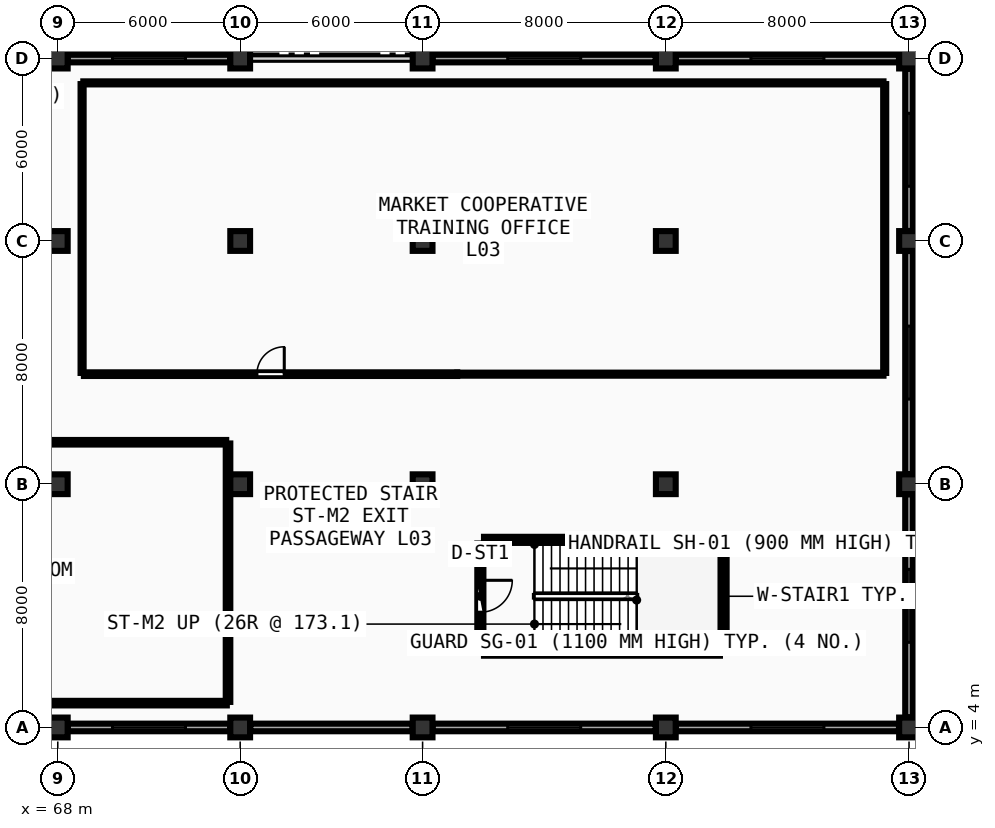
"""IFC4 building model, lengths in metres.
Left out: names, types, materials, properties, quantities, classifications, styles, units other than length and angle.
Written with IfcOpenShell. Run it as: python <this file> out.ifc"""

import sys

from ifc_helpers import new_model, si_unit, direction, frame, frame_2d, origin, origin_2d, place, context, subcontext, project, spatial, rectangle, extrude, element, fill, save


model = new_model("IFC4")
c1 = context("Model", 3, precision=1e-05, world=origin(), true_north=direction((0.0, 1.0)))
c2 = subcontext(c1, "Body", "Model", "MODEL_VIEW")
j1 = project(units=[si_unit("LENGTHUNIT", "METRE"), si_unit("PLANEANGLEUNIT", "RADIAN")], contexts=[c1])
p1 = place(None, origin())
s1 = spatial("IfcSite", under=j1, at=p1, CompositionType="ELEMENT")
p2 = place(p1, origin())
s2 = spatial("IfcBuilding", under=s1, at=p2, CompositionType="ELEMENT")
p3 = place(p2, frame((0.0, 0.0, 13.5)))
s3 = spatial("IfcBuildingStorey", under=s2, at=p3, CompositionType="ELEMENT", Elevation=13.5)
for number, where, z_axis, x_axis in (
    (1, (68.0, 4.0, 0.0), (0.0, 0.0, 1.0), (1.0, 0.0, 0.0)),
    (2, (68.0, 12.0, 0.0), (0.0, 0.0, 1.0), (1.0, 0.0, 0.0)),
    (3, (68.0, 20.0, 0.0), (0.0, 0.0, 1.0), (1.0, 0.0, 0.0)),
    (4, (68.0, 26.0, 0.0), (0.0, 0.0, 1.0), (1.0, 0.0, 0.0)),
    (5, (74.0, 4.0, 0.0), (0.0, 0.0, 1.0), (1.0, 0.0, 0.0)),
    (6, (74.0, 12.0, 0.0), (0.0, 0.0, 1.0), (1.0, 0.0, 0.0)),
    (7, (74.0, 20.0, 0.0), (0.0, 0.0, 1.0), (1.0, 0.0, 0.0)),
    (8, (74.0, 26.0, 0.0), (0.0, 0.0, 1.0), (1.0, 0.0, 0.0)),
    (9, (80.0, 4.0, 0.0), (0.0, 0.0, 1.0), (1.0, 0.0, 0.0)),
    (10, (80.0, 12.0, 0.0), (0.0, 0.0, 1.0), (1.0, 0.0, 0.0)),
    (11, (80.0, 20.0, 0.0), (0.0, 0.0, 1.0), (1.0, 0.0, 0.0)),
    (12, (80.0, 26.0, 0.0), (0.0, 0.0, 1.0), (1.0, 0.0, 0.0)),
    (13, (88.0, 4.0, 0.0), (0.0, 0.0, 1.0), (1.0, 0.0, 0.0)),
    (14, (88.0, 12.0, 0.0), (0.0, 0.0, 1.0), (1.0, 0.0, 0.0)),
    (15, (88.0, 20.0, 0.0), (0.0, 0.0, 1.0), (1.0, 0.0, 0.0)),
    (16, (88.0, 26.0, 0.0), (0.0, 0.0, 1.0), (1.0, 0.0, 0.0)),
    (17, (96.0, 4.0, 0.0), (0.0, 0.0, 1.0), (1.0, 0.0, 0.0)),
    (18, (96.0, 12.0, 0.0), (0.0, 0.0, 1.0), (1.0, 0.0, 0.0)),
    (19, (96.0, 20.0, 0.0), (0.0, 0.0, 1.0), (1.0, 0.0, 0.0)),
    (20, (96.0, 26.0, 0.0), (0.0, 0.0, 1.0), (1.0, 0.0, 0.0)),
):
    element("IfcColumn", number, at=place(p3, frame(where, z_axis=z_axis, x_axis=x_axis)), inside=s3, PredefinedType="COLUMN", context=c2, shape_type="SweptSolid", body=[
        extrude(rectangle(XDim=0.65, YDim=0.65, at=origin_2d()), origin(), (0.0, 0.0, 1.0), 4.5),
    ])
p4 = place(p3, frame((68.33, 4.0, 0.0), z_axis=(0.0, 0.0, 1.0), x_axis=(1.0, 0.0, 0.0)))
e21 = element("IfcWall", 21, at=p4, inside=s3, PredefinedType="SOLIDWALL", context=c2, shape_type="SweptSolid", body=[
    extrude(rectangle(XDim=5.34, YDim=0.25, at=frame_2d((2.67, 0.0))), origin(), (0.0, 0.0, 1.0), 3.42),
])
p5 = place(p4, frame((1.47, 0.0, 0.95)))
e22 = element("IfcOpeningElement", 22, at=p5, cuts=e21, PredefinedType="OPENING", context=c2, shape_type="SweptSolid", body=[
    extrude(rectangle(XDim=2.4, YDim=1.65, at=frame_2d((1.2, 0.825))), frame((0.0, 0.135, 0.0), z_axis=(0.0, -1.0, 0.0), x_axis=(1.0, 0.0, 0.0)), (0.0, 0.0, 1.0), 0.27),
])
p6 = place(p3, frame((74.33, 4.0, 0.0), z_axis=(0.0, 0.0, 1.0), x_axis=(1.0, 0.0, 0.0)))
e23 = element("IfcWall", 23, at=p6, inside=s3, PredefinedType="SOLIDWALL", context=c2, shape_type="SweptSolid", body=[
    extrude(rectangle(XDim=5.34, YDim=0.25, at=frame_2d((2.67, 0.0))), origin(), (0.0, 0.0, 1.0), 3.42),
])
p7 = place(p3, frame((80.33, 4.0, 0.0), z_axis=(0.0, 0.0, 1.0), x_axis=(1.0, 0.0, 0.0)))
e24 = element("IfcWall", 24, at=p7, inside=s3, PredefinedType="SOLIDWALL", context=c2, shape_type="SweptSolid", body=[
    extrude(rectangle(XDim=7.34, YDim=0.25, at=frame_2d((3.67, 0.0))), origin(), (0.0, 0.0, 1.0), 3.42),
])
p8 = place(p7, frame((2.47, 0.0, 0.95)))
e25 = element("IfcOpeningElement", 25, at=p8, cuts=e24, PredefinedType="OPENING", context=c2, shape_type="SweptSolid", body=[
    extrude(rectangle(XDim=2.4, YDim=1.65, at=frame_2d((1.2, 0.825))), frame((0.0, 0.135, 0.0), z_axis=(0.0, -1.0, 0.0), x_axis=(1.0, 0.0, 0.0)), (0.0, 0.0, 1.0), 0.27),
])
p9 = place(p3, frame((88.33, 4.0, 0.0), z_axis=(0.0, 0.0, 1.0), x_axis=(1.0, 0.0, 0.0)))
e26 = element("IfcWall", 26, at=p9, inside=s3, PredefinedType="SOLIDWALL", context=c2, shape_type="SweptSolid", body=[
    extrude(rectangle(XDim=7.34, YDim=0.25, at=frame_2d((3.67, 0.0))), origin(), (0.0, 0.0, 1.0), 3.42),
])
p10 = place(p9, frame((2.47, 0.0, 0.95)))
e27 = element("IfcOpeningElement", 27, at=p10, cuts=e26, PredefinedType="OPENING", context=c2, shape_type="SweptSolid", body=[
    extrude(rectangle(XDim=2.4, YDim=1.65, at=frame_2d((1.2, 0.825))), frame((0.0, 0.135, 0.0), z_axis=(0.0, -1.0, 0.0), x_axis=(1.0, 0.0, 0.0)), (0.0, 0.0, 1.0), 0.27),
])
p11 = place(p3, frame((96.0, 4.33, 0.0), z_axis=(0.0, 0.0, 1.0), x_axis=(0.0, 1.0, 0.0)))
e28 = element("IfcWall", 28, at=p11, inside=s3, PredefinedType="SOLIDWALL", context=c2, shape_type="SweptSolid", body=[
    extrude(rectangle(XDim=7.34, YDim=0.25, at=frame_2d((3.67, 0.0))), origin(), (0.0, 0.0, 1.0), 3.42),
])
p12 = place(p11, frame((2.47, 0.0, 0.95)))
e29 = element("IfcOpeningElement", 29, at=p12, cuts=e28, PredefinedType="OPENING", context=c2, shape_type="SweptSolid", body=[
    extrude(rectangle(XDim=2.4, YDim=1.65, at=frame_2d((1.2, 0.825))), frame((0.0, 0.135, 0.0), z_axis=(0.0, -1.0, 0.0), x_axis=(1.0, 0.0, 0.0)), (0.0, 0.0, 1.0), 0.27),
])
p13 = place(p3, frame((96.0, 12.33, 0.0), z_axis=(0.0, 0.0, 1.0), x_axis=(0.0, 1.0, 0.0)))
e30 = element("IfcWall", 30, at=p13, inside=s3, PredefinedType="SOLIDWALL", context=c2, shape_type="SweptSolid", body=[
    extrude(rectangle(XDim=7.34, YDim=0.25, at=frame_2d((3.67, 0.0))), origin(), (0.0, 0.0, 1.0), 3.42),
])
p14 = place(p13, frame((2.47, 0.0, 0.95)))
e31 = element("IfcOpeningElement", 31, at=p14, cuts=e30, PredefinedType="OPENING", context=c2, shape_type="SweptSolid", body=[
    extrude(rectangle(XDim=2.4, YDim=1.65, at=frame_2d((1.2, 0.825))), frame((0.0, 0.135, 0.0), z_axis=(0.0, -1.0, 0.0), x_axis=(1.0, 0.0, 0.0)), (0.0, 0.0, 1.0), 0.27),
])
p15 = place(p3, frame((96.0, 20.33, 0.0), z_axis=(0.0, 0.0, 1.0), x_axis=(0.0, 1.0, 0.0)))
e32 = element("IfcWall", 32, at=p15, inside=s3, PredefinedType="SOLIDWALL", context=c2, shape_type="SweptSolid", body=[
    extrude(rectangle(XDim=5.34, YDim=0.25, at=frame_2d((2.67, 0.0))), origin(), (0.0, 0.0, 1.0), 3.42),
])
p16 = place(p15, frame((1.47, 0.0, 0.95)))
e33 = element("IfcOpeningElement", 33, at=p16, cuts=e32, PredefinedType="OPENING", context=c2, shape_type="SweptSolid", body=[
    extrude(rectangle(XDim=2.4, YDim=1.65, at=frame_2d((1.2, 0.825))), frame((0.0, 0.135, 0.0), z_axis=(0.0, -1.0, 0.0), x_axis=(1.0, 0.0, 0.0)), (0.0, 0.0, 1.0), 0.27),
])
p17 = place(p3, frame((95.67, 26.0, 0.0), z_axis=(0.0, 0.0, 1.0), x_axis=(-1.0, 0.0, 0.0)))
e34 = element("IfcWall", 34, at=p17, inside=s3, PredefinedType="SOLIDWALL", context=c2, shape_type="SweptSolid", body=[
    extrude(rectangle(XDim=7.34, YDim=0.25, at=frame_2d((3.67, 0.0))), origin(), (0.0, 0.0, 1.0), 3.42),
])
p18 = place(p17, frame((2.47, 0.0, 0.95)))
e35 = element("IfcOpeningElement", 35, at=p18, cuts=e34, PredefinedType="OPENING", context=c2, shape_type="SweptSolid", body=[
    extrude(rectangle(XDim=2.4, YDim=1.65, at=frame_2d((1.2, 0.825))), frame((0.0, 0.135, 0.0), z_axis=(0.0, -1.0, 0.0), x_axis=(1.0, 0.0, 0.0)), (0.0, 0.0, 1.0), 0.27),
])
p19 = place(p3, frame((87.67, 26.0, 0.0), z_axis=(0.0, 0.0, 1.0), x_axis=(-1.0, 0.0, 0.0)))
e36 = element("IfcWall", 36, at=p19, inside=s3, PredefinedType="SOLIDWALL", context=c2, shape_type="SweptSolid", body=[
    extrude(rectangle(XDim=7.34, YDim=0.25, at=frame_2d((3.67, 0.0))), origin(), (0.0, 0.0, 1.0), 3.42),
])
p20 = place(p19, frame((2.47, 0.0, 0.95)))
e37 = element("IfcOpeningElement", 37, at=p20, cuts=e36, PredefinedType="OPENING", context=c2, shape_type="SweptSolid", body=[
    extrude(rectangle(XDim=2.4, YDim=1.65, at=frame_2d((1.2, 0.825))), frame((0.0, 0.135, 0.0), z_axis=(0.0, -1.0, 0.0), x_axis=(1.0, 0.0, 0.0)), (0.0, 0.0, 1.0), 0.27),
])
p21 = place(p3, frame((73.67, 26.0, 0.0), z_axis=(0.0, 0.0, 1.0), x_axis=(-1.0, 0.0, 0.0)))
e38 = element("IfcWall", 38, at=p21, inside=s3, PredefinedType="SOLIDWALL", context=c2, shape_type="SweptSolid", body=[
    extrude(rectangle(XDim=5.34, YDim=0.25, at=frame_2d((2.67, 0.0))), origin(), (0.0, 0.0, 1.0), 3.42),
])
p22 = place(p21, frame((1.47, 0.0, 0.95)))
e39 = element("IfcOpeningElement", 39, at=p22, cuts=e38, PredefinedType="OPENING", context=c2, shape_type="SweptSolid", body=[
    extrude(rectangle(XDim=2.4, YDim=1.65, at=frame_2d((1.2, 0.825))), frame((0.0, 0.135, 0.0), z_axis=(0.0, -1.0, 0.0), x_axis=(1.0, 0.0, 0.0)), (0.0, 0.0, 1.0), 0.27),
])
p23 = place(p3, frame((82.02, 6.46, 0.0), z_axis=(0.0, 0.0, 1.0), x_axis=(1.0, 0.0, 0.0)))
e40 = element("IfcWall", 40, at=p23, inside=s3, PredefinedType="SHEAR", context=c2, shape_type="SweptSolid", body=[
    extrude(rectangle(XDim=7.76, YDim=0.2, at=frame_2d((3.88, 0.0))), origin(), (0.0, 0.0, 1.0), 4.24),
])
p24 = place(p3, frame((89.9, 6.58, 0.0), z_axis=(0.0, 0.0, 1.0), x_axis=(0.0, 1.0, 0.0)))
e41 = element("IfcWall", 41, at=p24, inside=s3, PredefinedType="SHEAR", context=c2, shape_type="SweptSolid", body=[
    extrude(rectangle(XDim=3.47, YDim=0.2, at=frame_2d((1.735, 0.0))), origin(), (0.0, 0.0, 1.0), 4.24),
])
p25 = place(p3, frame((89.78, 10.17, 0.0), z_axis=(0.0, 0.0, 1.0), x_axis=(-1.0, 0.0, 0.0)))
e42 = element("IfcWall", 42, at=p25, inside=s3, PredefinedType="SHEAR", context=c2, shape_type="SweptSolid", body=[
    extrude(rectangle(XDim=7.76, YDim=0.2, at=frame_2d((3.88, 0.0))), origin(), (0.0, 0.0, 1.0), 4.24),
])
p26 = place(p3, frame((81.9, 10.05, 0.0), z_axis=(0.0, 0.0, 1.0), x_axis=(0.0, -1.0, 0.0)))
e43 = element("IfcWall", 43, at=p26, inside=s3, PredefinedType="SHEAR", context=c2, shape_type="SweptSolid", body=[
    extrude(rectangle(XDim=3.47, YDim=0.2, at=frame_2d((1.735, 0.0))), origin(), (0.0, 0.0, 1.0), 4.24),
])
p27 = place(p26, frame((1.21, 0.0, 0.0)))
e44 = element("IfcOpeningElement", 44, at=p27, cuts=e43, PredefinedType="OPENING", context=c2, shape_type="SweptSolid", body=[
    extrude(rectangle(XDim=1.05, YDim=2.1, at=frame_2d((0.525, 1.05))), frame((0.0, 0.11, 0.0), z_axis=(0.0, -1.0, 0.0), x_axis=(1.0, 0.0, 0.0)), (0.0, 0.0, 1.0), 0.22),
])
p28 = place(p3, frame((68.86, 15.62, 0.0), z_axis=(0.0, 0.0, 1.0), x_axis=(1.0, 0.0, 0.0)))
e45 = element("IfcWall", 45, at=p28, inside=s3, PredefinedType="PARTITIONING", context=c2, shape_type="SweptSolid", body=[
    extrude(rectangle(XDim=12.28, YDim=0.12, at=frame_2d((6.14, 0.0))), origin(), (0.0, 0.0, 1.0), 3.425),
])
p29 = place(p28, frame((5.69, 0.0, 0.0)))
e46 = element("IfcOpeningElement", 46, at=p29, cuts=e45, PredefinedType="OPENING", context=c2, shape_type="SweptSolid", body=[
    extrude(rectangle(XDim=0.9, YDim=2.08, at=frame_2d((0.45, 1.04))), frame((0.0, 0.07, 0.0), z_axis=(0.0, -1.0, 0.0), x_axis=(1.0, 0.0, 0.0)), (0.0, 0.0, 1.0), 0.14),
])
p30 = place(p3, frame((36.86, 13.38, 0.0), z_axis=(0.0, 0.0, 1.0), x_axis=(1.0, 0.0, 0.0)))
e47 = element("IfcWall", 47, at=p30, inside=s3, PredefinedType="PARTITIONING", context=c2, shape_type="SweptSolid", body=[
    extrude(rectangle(XDim=36.68, YDim=0.15, at=frame_2d((18.34, 0.0))), origin(), (0.0, 0.0, 1.0), 3.425),
])
p31 = place(p30, frame((17.8, 0.0, 0.0)))
e48 = element("IfcOpeningElement", 48, at=p31, cuts=e47, PredefinedType="OPENING", context=c2, shape_type="SweptSolid", body=[
    extrude(rectangle(XDim=1.08, YDim=2.1, at=frame_2d((0.54, 1.05))), frame((0.0, 0.085, 0.0), z_axis=(0.0, -1.0, 0.0), x_axis=(1.0, 0.0, 0.0)), (0.0, 0.0, 1.0), 0.17),
])
p32 = place(p3, frame((81.14, 15.62, 0.0), z_axis=(0.0, 0.0, 1.0), x_axis=(1.0, 0.0, 0.0)))
e49 = element("IfcWall", 49, at=p32, inside=s3, PredefinedType="PARTITIONING", context=c2, shape_type="SweptSolid", body=[
    extrude(rectangle(XDim=14.02, YDim=0.1, at=frame_2d((7.01, 0.0))), origin(), (0.0, 0.0, 1.0), 3.425),
])
p33 = place(p3, frame((95.2, 15.66, 0.0), z_axis=(0.0, 0.0, 1.0), x_axis=(0.0, 1.0, 0.0)))
e50 = element("IfcWall", 50, at=p33, inside=s3, PredefinedType="PARTITIONING", context=c2, shape_type="SweptSolid", body=[
    extrude(rectangle(XDim=9.5, YDim=0.1, at=frame_2d((4.75, 0.0))), origin(), (0.0, 0.0, 1.0), 3.425),
])
p34 = place(p3, frame((95.16, 25.2, 0.0), z_axis=(0.0, 0.0, 1.0), x_axis=(-1.0, 0.0, 0.0)))
e51 = element("IfcWall", 51, at=p34, inside=s3, PredefinedType="PARTITIONING", context=c2, shape_type="SweptSolid", body=[
    extrude(rectangle(XDim=26.32, YDim=0.1, at=frame_2d((13.16, 0.0))), origin(), (0.0, 0.0, 1.0), 3.425),
])
p35 = place(p3, frame((68.8, 25.16, 0.0), z_axis=(0.0, 0.0, 1.0), x_axis=(0.0, -1.0, 0.0)))
e52 = element("IfcWall", 52, at=p35, inside=s3, PredefinedType="PARTITIONING", context=c2, shape_type="SweptSolid", body=[
    extrude(rectangle(XDim=9.5, YDim=0.1, at=frame_2d((4.75, 0.0))), origin(), (0.0, 0.0, 1.0), 3.425),
])
p36 = place(p3, frame((36.84, 4.8, 0.0), z_axis=(0.0, 0.0, 1.0), x_axis=(1.0, 0.0, 0.0)))
e53 = element("IfcWall", 53, at=p36, inside=s3, PredefinedType="PARTITIONING", context=c2, shape_type="SweptSolid", body=[
    extrude(rectangle(XDim=36.72, YDim=0.15, at=frame_2d((18.36, 0.0))), origin(), (0.0, 0.0, 1.0), 3.425),
])
p37 = place(p3, frame((73.6, 4.84, 0.0), z_axis=(0.0, 0.0, 1.0), x_axis=(0.0, 1.0, 0.0)))
e54 = element("IfcWall", 54, at=p37, inside=s3, PredefinedType="PARTITIONING", context=c2, shape_type="SweptSolid", body=[
    extrude(rectangle(XDim=8.5, YDim=0.15, at=frame_2d((4.25, 0.0))), origin(), (0.0, 0.0, 1.0), 3.425),
])
p38 = place(p5, origin())
e55 = element("IfcWindow", 55, at=p38, inside=s3, PartitioningType="SINGLE_PANEL", PredefinedType="WINDOW", context=c2, shape_type="SweptSolid", body=[
    extrude(rectangle(XDim=2.4, YDim=1.65, at=frame_2d((1.2, 0.825))), frame((0.0, 0.03, 0.0), z_axis=(0.0, -1.0, 0.0), x_axis=(1.0, 0.0, 0.0)), (0.0, 0.0, 1.0), 0.06),
])
fill(e22, e55)
p39 = place(p8, origin())
e56 = element("IfcWindow", 56, at=p39, inside=s3, PartitioningType="SINGLE_PANEL", PredefinedType="WINDOW", context=c2, shape_type="SweptSolid", body=[
    extrude(rectangle(XDim=2.4, YDim=1.65, at=frame_2d((1.2, 0.825))), frame((0.0, 0.03, 0.0), z_axis=(0.0, -1.0, 0.0), x_axis=(1.0, 0.0, 0.0)), (0.0, 0.0, 1.0), 0.06),
])
fill(e25, e56)
p40 = place(p10, origin())
e57 = element("IfcWindow", 57, at=p40, inside=s3, PartitioningType="SINGLE_PANEL", PredefinedType="WINDOW", context=c2, shape_type="SweptSolid", body=[
    extrude(rectangle(XDim=2.4, YDim=1.65, at=frame_2d((1.2, 0.825))), frame((0.0, 0.03, 0.0), z_axis=(0.0, -1.0, 0.0), x_axis=(1.0, 0.0, 0.0)), (0.0, 0.0, 1.0), 0.06),
])
fill(e27, e57)
p41 = place(p12, origin())
e58 = element("IfcWindow", 58, at=p41, inside=s3, PartitioningType="SINGLE_PANEL", PredefinedType="WINDOW", context=c2, shape_type="SweptSolid", body=[
    extrude(rectangle(XDim=2.4, YDim=1.65, at=frame_2d((1.2, 0.825))), frame((0.0, 0.03, 0.0), z_axis=(0.0, -1.0, 0.0), x_axis=(1.0, 0.0, 0.0)), (0.0, 0.0, 1.0), 0.06),
])
fill(e29, e58)
p42 = place(p14, origin())
e59 = element("IfcWindow", 59, at=p42, inside=s3, PartitioningType="SINGLE_PANEL", PredefinedType="WINDOW", context=c2, shape_type="SweptSolid", body=[
    extrude(rectangle(XDim=2.4, YDim=1.65, at=frame_2d((1.2, 0.825))), frame((0.0, 0.03, 0.0), z_axis=(0.0, -1.0, 0.0), x_axis=(1.0, 0.0, 0.0)), (0.0, 0.0, 1.0), 0.06),
])
fill(e31, e59)
p43 = place(p16, origin())
e60 = element("IfcWindow", 60, at=p43, inside=s3, PartitioningType="SINGLE_PANEL", PredefinedType="WINDOW", context=c2, shape_type="SweptSolid", body=[
    extrude(rectangle(XDim=2.4, YDim=1.65, at=frame_2d((1.2, 0.825))), frame((0.0, 0.03, 0.0), z_axis=(0.0, -1.0, 0.0), x_axis=(1.0, 0.0, 0.0)), (0.0, 0.0, 1.0), 0.06),
])
fill(e33, e60)
p44 = place(p18, origin())
e61 = element("IfcWindow", 61, at=p44, inside=s3, PartitioningType="SINGLE_PANEL", PredefinedType="WINDOW", context=c2, shape_type="SweptSolid", body=[
    extrude(rectangle(XDim=2.4, YDim=1.65, at=frame_2d((1.2, 0.825))), frame((0.0, 0.03, 0.0), z_axis=(0.0, -1.0, 0.0), x_axis=(1.0, 0.0, 0.0)), (0.0, 0.0, 1.0), 0.06),
])
fill(e35, e61)
p45 = place(p20, origin())
e62 = element("IfcWindow", 62, at=p45, inside=s3, PartitioningType="SINGLE_PANEL", PredefinedType="WINDOW", context=c2, shape_type="SweptSolid", body=[
    extrude(rectangle(XDim=2.4, YDim=1.65, at=frame_2d((1.2, 0.825))), frame((0.0, 0.03, 0.0), z_axis=(0.0, -1.0, 0.0), x_axis=(1.0, 0.0, 0.0)), (0.0, 0.0, 1.0), 0.06),
])
fill(e37, e62)
p46 = place(p22, origin())
e63 = element("IfcWindow", 63, at=p46, inside=s3, PartitioningType="SINGLE_PANEL", PredefinedType="WINDOW", context=c2, shape_type="SweptSolid", body=[
    extrude(rectangle(XDim=2.4, YDim=1.65, at=frame_2d((1.2, 0.825))), frame((0.0, 0.03, 0.0), z_axis=(0.0, -1.0, 0.0), x_axis=(1.0, 0.0, 0.0)), (0.0, 0.0, 1.0), 0.06),
])
fill(e39, e63)
p47 = place(p27, origin())
e64 = element("IfcDoor", 64, at=p47, inside=s3, OperationType="SINGLE_SWING_LEFT", PredefinedType="DOOR", context=c2, shape_type="SweptSolid", body=[
    extrude(rectangle(XDim=1.05, YDim=2.1, at=frame_2d((0.525, 1.05))), frame((0.0, 0.025, 0.0), z_axis=(0.0, -1.0, 0.0), x_axis=(1.0, 0.0, 0.0)), (0.0, 0.0, 1.0), 0.05),
])
fill(e44, e64)
p48 = place(p29, origin())
e65 = element("IfcDoor", 65, at=p48, inside=s3, OperationType="SINGLE_SWING_RIGHT", PredefinedType="DOOR", context=c2, shape_type="SweptSolid", body=[
    extrude(rectangle(XDim=0.9, YDim=2.08, at=frame_2d((0.45, 1.04))), frame((0.0, 0.025, 0.0), z_axis=(0.0, -1.0, 0.0), x_axis=(1.0, 0.0, 0.0)), (0.0, 0.0, 1.0), 0.05),
])
fill(e46, e65)
save(model, sys.argv[1])
